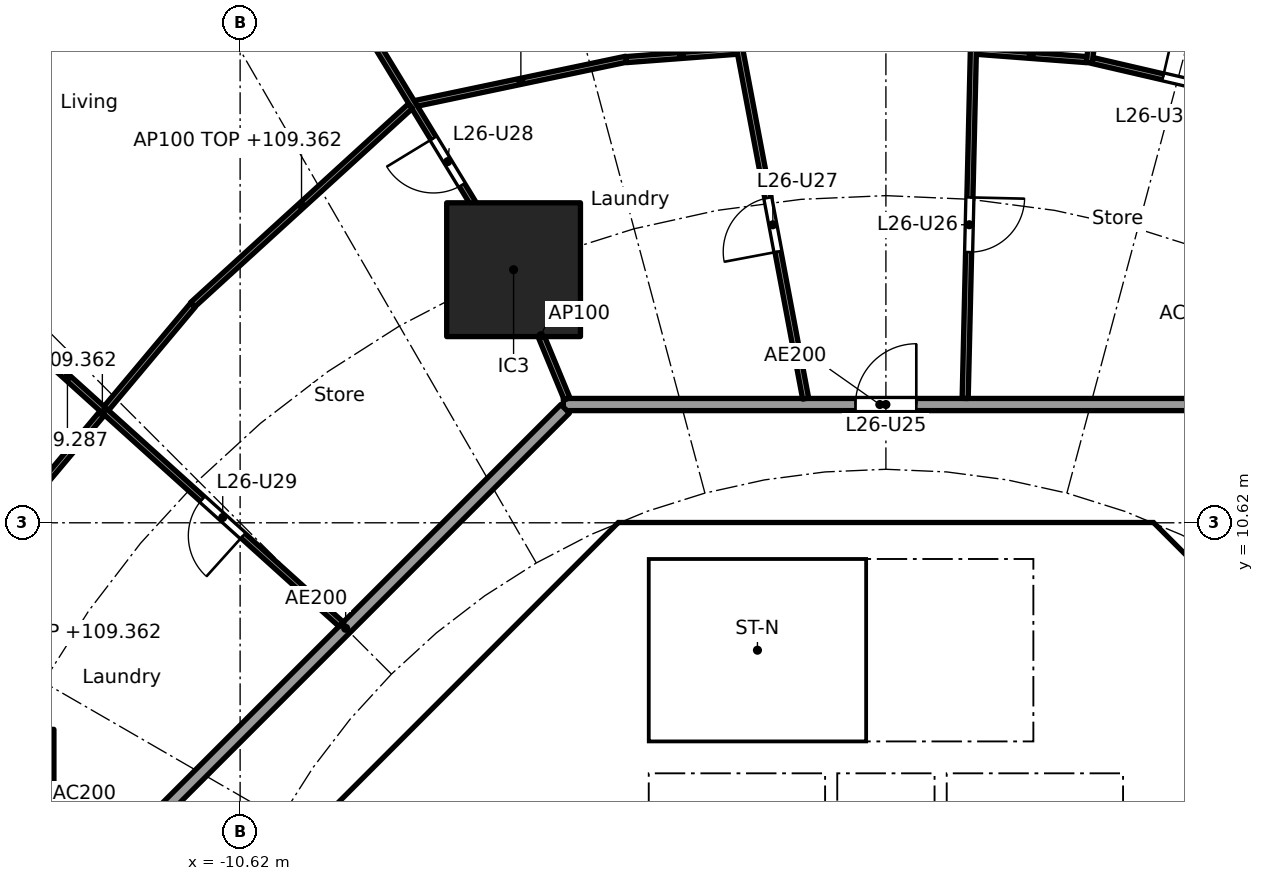
"""IFC4 building model, lengths in metres.
Left out: names, types, materials, properties, quantities, classifications, styles, units other than length and angle.
Written with IfcOpenShell. Run it as: python <this file> out.ifc"""

import sys

from ifc_helpers import new_model, si_unit, direction, frame, frame_2d, origin, origin_2d, place, context, subcontext, project, spatial, polyline, rectangle, outline, extrude, element, fill, save


model = new_model("IFC4")
c1 = context("Model", 3, precision=1e-05, world=origin(), true_north=direction((0.0, 1.0)))
c2 = subcontext(c1, "Body", "Model", "MODEL_VIEW")
j1 = project(units=[si_unit("LENGTHUNIT", "METRE"), si_unit("PLANEANGLEUNIT", "RADIAN")], contexts=[c1])
p1 = place(None, origin())
s1 = spatial("IfcSite", under=j1, at=p1, CompositionType="ELEMENT")
p2 = place(p1, origin())
s2 = spatial("IfcBuilding", under=s1, at=p2, CompositionType="ELEMENT")
p3 = place(p2, frame((0.0, 0.0, 106.6)))
s3 = spatial("IfcBuildingStorey", under=s2, at=p3, CompositionType="ELEMENT", Elevation=106.6)
for number, where, z_axis, x_axis in (
    (1, (-6.123, 14.782, 0.0), (0.0, 0.0, 1.0), (1.0, 0.0, 0.0)),
    (2, (-14.782, 6.123, 0.0), (0.0, 0.0, 1.0), (1.0, 0.0, 0.0)),
):
    element("IfcColumn", number, at=place(p3, frame(where, z_axis=z_axis, x_axis=x_axis)), inside=s3, PredefinedType="COLUMN", context=c2, shape_type="SweptSolid", body=[
        extrude(rectangle(XDim=2.2, YDim=2.2, at=origin_2d()), origin(), (0.0, 0.0, 1.0), 3.7),
    ])
p4 = place(p3, frame((9.988, 4.613, 0.0), z_axis=(0.0, 0.0, 1.0), x_axis=(-0.707106781187, 0.707106781187, 0.0)))
e3 = element("IfcWall", 3, at=p4, inside=s3, PredefinedType="SHEAR", context=c2, shape_type="SweptSolid", body=[
    extrude(rectangle(XDim=7.602, YDim=0.6, at=frame_2d((3.801, 0.0))), origin(), (0.0, 0.0, 1.0), 3.44),
])
p5 = place(p4, frame((3.201, 0.0, 0.0)))
e4 = element("IfcOpeningElement", 4, at=p5, cuts=e3, PredefinedType="OPENING", context=c2, shape_type="SweptSolid", body=[
    extrude(rectangle(XDim=1.2, YDim=2.1, at=frame_2d((0.6, 1.05))), frame((0.0, 0.31, 0.0), z_axis=(0.0, -1.0, 0.0), x_axis=(1.0, 0.0, 0.0)), (0.0, 0.0, 1.0), 0.62),
])
p6 = place(p3, frame((-4.613, 9.988, 0.0), z_axis=(0.0, 0.0, 1.0), x_axis=(-0.707106781187, -0.707106781187, 0.0)))
e5 = element("IfcWall", 5, at=p6, inside=s3, PredefinedType="SHEAR", context=c2, shape_type="SweptSolid", body=[
    extrude(rectangle(XDim=7.602, YDim=0.6, at=frame_2d((3.801, 0.0))), origin(), (0.0, 0.0, 1.0), 3.44),
])
p7 = place(p6, frame((0.351, 0.0, 0.0)))
e6 = element("IfcOpeningElement", 6, at=p7, cuts=e5, PredefinedType="OPENING", context=c2, shape_type="SweptSolid", body=[
    extrude(rectangle(XDim=1.1, YDim=2.1, at=frame_2d((0.55, 1.05))), frame((0.0, 0.31, 0.0), z_axis=(0.0, -1.0, 0.0), x_axis=(1.0, 0.0, 0.0)), (0.0, 0.0, 1.0), 0.62),
])
p8 = place(p3, frame((-5.8, 4.3, 0.0), z_axis=(0.0, 0.0, 1.0), x_axis=(0.0, 1.0, 0.0)))
e7 = element("IfcWall", 7, at=p8, inside=s3, PredefinedType="PARTITIONING", context=c2, shape_type="SweptSolid", body=[
    extrude(rectangle(XDim=3.927, YDim=0.15, at=frame_2d((1.963, 0.0))), origin(), (0.0, 0.0, 1.0), 3.44),
])
p9 = place(p8, frame((0.413, 0.0, 0.0)))
e8 = element("IfcOpeningElement", 8, at=p9, cuts=e7, PredefinedType="OPENING", context=c2, shape_type="SweptSolid", body=[
    extrude(rectangle(XDim=0.9, YDim=2.1, at=frame_2d((0.45, 1.05))), frame((0.0, 0.085, 0.0), z_axis=(0.0, -1.0, 0.0), x_axis=(1.0, 0.0, 0.0)), (0.0, 0.0, 1.0), 0.17),
])
p10 = place(p8, frame((2.489, 0.0, 0.0)))
e9 = element("IfcOpeningElement", 9, at=p10, cuts=e7, PredefinedType="OPENING", context=c2, shape_type="SweptSolid", body=[
    extrude(rectangle(XDim=0.9, YDim=2.1, at=frame_2d((0.45, 1.05))), frame((0.0, 0.085, 0.0), z_axis=(0.0, -1.0, 0.0), x_axis=(1.0, 0.0, 0.0)), (0.0, 0.0, 1.0), 0.17),
])
p11 = place(p3, frame((4.0, 4.3, 0.0), z_axis=(0.0, 0.0, 1.0), x_axis=(0.0, 1.0, 0.0)))
e10 = element("IfcWall", 10, at=p11, inside=s3, PredefinedType="SOLIDWALL", context=c2, shape_type="SweptSolid", body=[
    extrude(rectangle(XDim=2.2, YDim=0.2, at=frame_2d((1.1, 0.0))), origin(), (0.0, 0.0, 1.0), 3.44),
])
p12 = place(p11, frame((0.55, 0.0, 0.0)))
e11 = element("IfcOpeningElement", 11, at=p12, cuts=e10, PredefinedType="OPENING", context=c2, shape_type="SweptSolid", body=[
    extrude(rectangle(XDim=1.1, YDim=2.1, at=frame_2d((0.55, 1.05))), frame((0.0, 0.11, 0.0), z_axis=(0.0, -1.0, 0.0), x_axis=(1.0, 0.0, 0.0)), (0.0, 0.0, 1.0), 0.22),
])
p13 = place(p3, frame((-4.0, 4.3, 0.0), z_axis=(0.0, 0.0, 1.0), x_axis=(0.0, 1.0, 0.0)))
e12 = element("IfcWall", 12, at=p13, inside=s3, PredefinedType="SOLIDWALL", context=c2, shape_type="SweptSolid", body=[
    extrude(rectangle(XDim=2.2, YDim=0.2, at=frame_2d((1.1, 0.0))), origin(), (0.0, 0.0, 1.0), 3.44),
])
p14 = place(p13, frame((0.55, 0.0, 0.0)))
e13 = element("IfcOpeningElement", 13, at=p14, cuts=e12, PredefinedType="OPENING", context=c2, shape_type="SweptSolid", body=[
    extrude(rectangle(XDim=1.1, YDim=2.1, at=frame_2d((0.55, 1.05))), frame((0.0, 0.11, 0.0), z_axis=(0.0, -1.0, 0.0), x_axis=(1.0, 0.0, 0.0)), (0.0, 0.0, 1.0), 0.22),
])
p15 = place(p3, frame((4.0, 7.025, 0.0), z_axis=(0.0, 0.0, 1.0), x_axis=(0.0, 1.0, 0.0)))
e14 = element("IfcWall", 14, at=p15, inside=s3, PredefinedType="SOLIDWALL", context=c2, shape_type="SweptSolid", body=[
    extrude(rectangle(XDim=3.0, YDim=0.2, at=frame_2d((1.5, 0.0))), origin(), (0.0, 0.0, 1.0), 3.44),
])
p16 = place(p15, frame((0.925, 0.0, 0.0)))
e15 = element("IfcOpeningElement", 15, at=p16, cuts=e14, PredefinedType="OPENING", context=c2, shape_type="SweptSolid", body=[
    extrude(rectangle(XDim=1.1, YDim=2.1, at=frame_2d((0.55, 1.05))), frame((0.0, 0.11, 0.0), z_axis=(0.0, -1.0, 0.0), x_axis=(1.0, 0.0, 0.0)), (0.0, 0.0, 1.0), 0.22),
])
p17 = place(p3, origin())
e16 = element("IfcWall", 16, at=p17, inside=s3, PredefinedType="SHEAR", context=c2, shape_type="SweptSolid", body=[
    extrude(outline(polyline([(-4.152, 10.025), (-4.401, 9.776), (-4.825, 10.2), (-4.401, 10.625), (4.401, 10.625), (4.825, 10.2), (4.401, 9.776), (4.152, 10.025), (-4.152, 10.025)])), origin(), (0.0, 0.0, 1.0), 3.44),
])
p18 = place(p3, frame((-8.001, 6.1, 0.0), z_axis=(0.0, 0.0, 1.0), x_axis=(1.0, 0.0, 0.0)))
e17 = element("IfcWall", 17, at=p18, inside=s3, PredefinedType="PARTITIONING", context=c2, shape_type="SweptSolid", body=[
    extrude(rectangle(XDim=2.126, YDim=0.15, at=frame_2d((1.063, 0.0))), origin(), (0.0, 0.0, 1.0), 3.44),
])
for number, where, z_axis, x_axis in (
    (18, (-0.9, 4.3, 0.0), (0.0, 0.0, 1.0), (0.0, 1.0, 0.0)),
    (19, (0.9, 4.3, 0.0), (0.0, 0.0, 1.0), (0.0, 1.0, 0.0)),
):
    element("IfcWall", number, at=place(p3, frame(where, z_axis=z_axis, x_axis=x_axis)), inside=s3, PredefinedType="SOLIDWALL", context=c2, shape_type="SweptSolid", body=[
        extrude(rectangle(XDim=2.2, YDim=0.2, at=frame_2d((1.1, 0.0))), origin(), (0.0, 0.0, 1.0), 3.44),
    ])
p19 = place(p3, origin())
e20 = element("IfcWall", 20, at=p19, inside=s3, PredefinedType="SOLIDWALL", context=c2, shape_type="SweptSolid", body=[
    extrude(outline(polyline([(-3.9, 7.025), (-4.1, 7.025), (-4.1, 10.025), (-3.9, 10.025), (-3.9, 7.025)])), origin(), (0.0, 0.0, 1.0), 3.44),
])
p20 = place(p3, origin())
e21 = element("IfcWall", 21, at=p20, inside=s3, PredefinedType="SOLIDWALL", context=c2, shape_type="SweptSolid", body=[
    extrude(outline(polyline([(4.1, 6.5), (-4.1, 6.5), (-4.1, 7.025), (4.1, 7.025), (4.1, 6.5)])), origin(), (0.0, 0.0, 1.0), 3.44),
])
p21 = place(p3, frame((-12.657, 5.243, 0.0), z_axis=(0.0, 0.0, 1.0), x_axis=(-0.923843626288, 0.382770106157, 0.0)))
e22 = element("IfcWall", 22, at=p21, inside=s3, PredefinedType="PARTITIONING", context=c2, shape_type="SweptSolid", body=[
    extrude(rectangle(XDim=2.199, YDim=0.2, at=frame_2d((1.1, 0.0))), origin(), (0.0, 0.0, 1.0), 3.44),
])
p22 = place(p3, frame((5.104, 12.565, 0.0), z_axis=(0.0, 0.0, 1.0), x_axis=(-1.0, 0.0, 0.0)))
e23 = element("IfcWall", 23, at=p22, inside=s3, PredefinedType="PARTITIONING", context=c2, shape_type="SweptSolid", body=[
    extrude(rectangle(XDim=10.409, YDim=0.2, at=frame_2d((5.205, 0.0))), origin(), (0.0, 0.0, 1.0), 3.44),
])
p23 = place(p22, frame((4.604, 0.0, 0.0)))
e24 = element("IfcOpeningElement", 24, at=p23, cuts=e23, PredefinedType="OPENING", context=c2, shape_type="SweptSolid", body=[
    extrude(rectangle(XDim=1.0, YDim=2.1, at=frame_2d((0.5, 1.05))), frame((0.0, 0.11, 0.0), z_axis=(0.0, -1.0, 0.0), x_axis=(1.0, 0.0, 0.0)), (0.0, 0.0, 1.0), 0.22),
])
p24 = place(p3, frame((-5.275, 12.494, 0.0), z_axis=(0.0, 0.0, 1.0), x_axis=(-0.707106781187, -0.707106781187, 0.0)))
e25 = element("IfcWall", 25, at=p24, inside=s3, PredefinedType="PARTITIONING", context=c2, shape_type="SweptSolid", body=[
    extrude(rectangle(XDim=10.209, YDim=0.2, at=frame_2d((5.104, 0.0))), origin(), (0.0, 0.0, 1.0), 3.44),
])
p25 = place(p3, frame((7.004, 17.386, 0.0), z_axis=(0.0, 0.0, 1.0), x_axis=(-0.974172890163, 0.22580341023, 0.0)))
e26 = element("IfcWall", 26, at=p25, inside=s3, PredefinedType="PARTITIONING", context=c2, shape_type="SweptSolid", body=[
    extrude(rectangle(XDim=3.702, YDim=0.1, at=frame_2d((1.851, 0.0))), origin(), (0.0, 0.0, 1.0), 2.762),
])
p26 = place(p25, frame((1.611, 0.0, 0.0)))
e27 = element("IfcOpeningElement", 27, at=p26, cuts=e26, PredefinedType="OPENING", context=c2, shape_type="SweptSolid", body=[
    extrude(rectangle(XDim=0.9, YDim=2.1, at=frame_2d((0.45, 1.05))), frame((0.0, 0.06, 0.0), z_axis=(0.0, -1.0, 0.0), x_axis=(1.0, 0.0, 0.0)), (0.0, 0.0, 1.0), 0.12),
])
p27 = place(p3, frame((3.343, 18.184, 0.0), z_axis=(0.0, 0.0, 1.0), x_axis=(0.130596603503, 0.991435589009, 0.0)))
e28 = element("IfcWall", 28, at=p27, inside=s3, PredefinedType="PARTITIONING", context=c2, shape_type="SweptSolid", body=[
    extrude(rectangle(XDim=7.511, YDim=0.1, at=frame_2d((3.756, 0.0))), origin(), (0.0, 0.0, 1.0), 3.44),
])
p28 = place(p3, frame((3.299, 18.237, 0.0), z_axis=(0.0, 0.0, 1.0), x_axis=(-0.997152920483, 0.075405922664, 0.0)))
e29 = element("IfcWall", 29, at=p28, inside=s3, PredefinedType="PARTITIONING", context=c2, shape_type="SweptSolid", body=[
    extrude(rectangle(XDim=1.823, YDim=0.1, at=frame_2d((0.911, 0.0))), origin(), (0.0, 0.0, 1.0), 2.762),
])
p29 = place(p3, frame((1.303, 12.665, 0.0), z_axis=(0.0, 0.0, 1.0), x_axis=(0.023564110689, 0.999722327793, 0.0)))
e30 = element("IfcWall", 30, at=p29, inside=s3, PredefinedType="PARTITIONING", context=c2, shape_type="SweptSolid", body=[
    extrude(rectangle(XDim=21.664, YDim=0.1, at=frame_2d((10.832, 0.0))), origin(), (0.0, 0.0, 1.0), 2.687),
])
p30 = place(p29, frame((2.407, 0.0, 0.0)))
e31 = element("IfcOpeningElement", 31, at=p30, cuts=e30, PredefinedType="OPENING", context=c2, shape_type="SweptSolid", body=[
    extrude(rectangle(XDim=0.9, YDim=2.1, at=frame_2d((0.45, 1.05))), frame((0.0, 0.06, 0.0), z_axis=(0.0, -1.0, 0.0), x_axis=(1.0, 0.0, 0.0)), (0.0, 0.0, 1.0), 0.12),
])
p31 = place(p29, frame((9.034, 0.0, 0.0)))
e32 = element("IfcOpeningElement", 32, at=p31, cuts=e30, PredefinedType="OPENING", context=c2, shape_type="SweptSolid", body=[
    extrude(rectangle(XDim=0.9, YDim=2.1, at=frame_2d((0.45, 1.05))), frame((0.0, 0.06, 0.0), z_axis=(0.0, -1.0, 0.0), x_axis=(1.0, 0.0, 0.0)), (0.0, 0.0, 1.0), 0.12),
])
p32 = place(p29, frame((17.009, 0.0, 0.0)))
e33 = element("IfcOpeningElement", 33, at=p32, cuts=e30, PredefinedType="OPENING", context=c2, shape_type="SweptSolid", body=[
    extrude(rectangle(XDim=0.9, YDim=2.1, at=frame_2d((0.45, 1.05))), frame((0.0, 0.06, 0.0), z_axis=(0.0, -1.0, 0.0), x_axis=(1.0, 0.0, 0.0)), (0.0, 0.0, 1.0), 0.12),
])
p33 = place(p3, frame((-1.32, 12.663, 0.0), z_axis=(0.0, 0.0, 1.0), x_axis=(-0.185450638662, 0.982653581187, 0.0)))
e34 = element("IfcWall", 34, at=p33, inside=s3, PredefinedType="PARTITIONING", context=c2, shape_type="SweptSolid", body=[
    extrude(rectangle(XDim=22.043, YDim=0.1, at=frame_2d((11.021, 0.0))), origin(), (0.0, 0.0, 1.0), 2.687),
])
p34 = place(p33, frame((2.458, 0.0, 0.0)))
e35 = element("IfcOpeningElement", 35, at=p34, cuts=e34, PredefinedType="OPENING", context=c2, shape_type="SweptSolid", body=[
    extrude(rectangle(XDim=0.9, YDim=2.1, at=frame_2d((0.45, 1.05))), frame((0.0, 0.06, 0.0), z_axis=(0.0, -1.0, 0.0), x_axis=(1.0, 0.0, 0.0)), (0.0, 0.0, 1.0), 0.12),
])
p35 = place(p33, frame((9.202, 0.0, 0.0)))
e36 = element("IfcOpeningElement", 36, at=p35, cuts=e34, PredefinedType="OPENING", context=c2, shape_type="SweptSolid", body=[
    extrude(rectangle(XDim=0.9, YDim=2.1, at=frame_2d((0.45, 1.05))), frame((0.0, 0.06, 0.0), z_axis=(0.0, -1.0, 0.0), x_axis=(1.0, 0.0, 0.0)), (0.0, 0.0, 1.0), 0.12),
])
p36 = place(p3, frame((-2.453, 18.374, 0.0), z_axis=(0.0, 0.0, 1.0), x_axis=(-0.997153681897, -0.075395853197, 0.0)))
e37 = element("IfcWall", 37, at=p36, inside=s3, PredefinedType="PARTITIONING", context=c2, shape_type="SweptSolid", body=[
    extrude(rectangle(XDim=1.823, YDim=0.1, at=frame_2d((0.912, 0.0))), origin(), (0.0, 0.0, 1.0), 3.44),
])
p37 = place(p3, frame((-4.272, 18.243, 0.0), z_axis=(0.0, 0.0, 1.0), x_axis=(-0.978622947907, -0.205662650547, 0.0)))
e38 = element("IfcWall", 38, at=p37, inside=s3, PredefinedType="PARTITIONING", context=c2, shape_type="SweptSolid", body=[
    extrude(rectangle(XDim=3.538, YDim=0.1, at=frame_2d((1.769, 0.0))), origin(), (0.0, 0.0, 1.0), 2.762),
])
p38 = place(p3, frame((-5.243, 12.657, 0.0), z_axis=(0.0, 0.0, 1.0), x_axis=(-0.382703272338, 0.923871314276, 0.0)))
e39 = element("IfcWall", 39, at=p38, inside=s3, PredefinedType="PARTITIONING", context=c2, shape_type="SweptSolid", body=[
    extrude(rectangle(XDim=2.249, YDim=0.1, at=frame_2d((1.125, 0.0))), origin(), (0.0, 0.0, 1.0), 3.44),
])
p39 = place(p3, frame((-6.149, 14.825, 0.0), z_axis=(0.0, 0.0, 1.0), x_axis=(-0.520411490252, 0.853915616917, 0.0)))
e40 = element("IfcWall", 40, at=p39, inside=s3, PredefinedType="PARTITIONING", context=c2, shape_type="SweptSolid", body=[
    extrude(rectangle(XDim=10.435, YDim=0.1, at=frame_2d((5.218, 0.0))), origin(), (0.0, 0.0, 1.0), 3.44),
])
p40 = place(p39, frame((1.582, 0.0, 0.0)))
e41 = element("IfcOpeningElement", 41, at=p40, cuts=e40, PredefinedType="OPENING", context=c2, shape_type="SweptSolid", body=[
    extrude(rectangle(XDim=0.9, YDim=2.1, at=frame_2d((0.45, 1.05))), frame((0.0, 0.06, 0.0), z_axis=(0.0, -1.0, 0.0), x_axis=(1.0, 0.0, 0.0)), (0.0, 0.0, 1.0), 0.12),
])
p41 = place(p39, frame((6.312, 0.0, 0.0)))
e42 = element("IfcOpeningElement", 42, at=p41, cuts=e40, PredefinedType="OPENING", context=c2, shape_type="SweptSolid", body=[
    extrude(rectangle(XDim=0.9, YDim=2.1, at=frame_2d((0.45, 1.05))), frame((0.0, 0.06, 0.0), z_axis=(0.0, -1.0, 0.0), x_axis=(1.0, 0.0, 0.0)), (0.0, 0.0, 1.0), 0.12),
])
p42 = place(p3, frame((-7.82, 17.472, 0.0), z_axis=(0.0, 0.0, 1.0), x_axis=(-0.73885182489, -0.67386792538, 0.0)))
e43 = element("IfcWall", 43, at=p42, inside=s3, PredefinedType="PARTITIONING", context=c2, shape_type="SweptSolid", body=[
    extrude(rectangle(XDim=4.846, YDim=0.1, at=frame_2d((2.423, 0.0))), origin(), (0.0, 0.0, 1.0), 2.762),
])
p43 = place(p3, frame((-11.396, 14.202, 0.0), z_axis=(0.0, 0.0, 1.0), x_axis=(-0.642475660273, -0.766306091557, 0.0)))
e44 = element("IfcWall", 44, at=p43, inside=s3, PredefinedType="PARTITIONING", context=c2, shape_type="SweptSolid", body=[
    extrude(rectangle(XDim=4.637, YDim=0.1, at=frame_2d((2.319, 0.0))), origin(), (0.0, 0.0, 1.0), 2.762),
])
p44 = place(p3, frame((-8.959, 8.952, 0.0), z_axis=(0.0, 0.0, 1.0), x_axis=(-0.742679904999, 0.669646592398, 0.0)))
e45 = element("IfcWall", 45, at=p44, inside=s3, PredefinedType="PARTITIONING", context=c2, shape_type="SweptSolid", body=[
    extrude(rectangle(XDim=12.121, YDim=0.1, at=frame_2d((6.061, 0.0))), origin(), (0.0, 0.0, 1.0), 2.687),
])
p45 = place(p44, frame((2.172, 0.0, 0.0)))
e46 = element("IfcOpeningElement", 46, at=p45, cuts=e45, PredefinedType="OPENING", context=c2, shape_type="SweptSolid", body=[
    extrude(rectangle(XDim=0.9, YDim=2.1, at=frame_2d((0.45, 1.05))), frame((0.0, 0.06, 0.0), z_axis=(0.0, -1.0, 0.0), x_axis=(1.0, 0.0, 0.0)), (0.0, 0.0, 1.0), 0.12),
])
p46 = place(p44, frame((8.233, 0.0, 0.0)))
e47 = element("IfcOpeningElement", 47, at=p46, cuts=e45, PredefinedType="OPENING", context=c2, shape_type="SweptSolid", body=[
    extrude(rectangle(XDim=0.9, YDim=2.1, at=frame_2d((0.45, 1.05))), frame((0.0, 0.06, 0.0), z_axis=(0.0, -1.0, 0.0), x_axis=(1.0, 0.0, 0.0)), (0.0, 0.0, 1.0), 0.12),
])
p47 = place(p16, origin())
e48 = element("IfcDoor", 48, at=p47, inside=s3, OperationType="SINGLE_SWING_LEFT", PredefinedType="DOOR", context=c2, shape_type="SweptSolid", body=[
    extrude(rectangle(XDim=1.1, YDim=2.1, at=frame_2d((0.55, 1.05))), frame((0.0, 0.025, 0.0), z_axis=(0.0, -1.0, 0.0), x_axis=(1.0, 0.0, 0.0)), (0.0, 0.0, 1.0), 0.05),
])
fill(e15, e48)
p48 = place(p10, origin())
e49 = element("IfcDoor", 49, at=p48, inside=s3, OperationType="SINGLE_SWING_RIGHT", PredefinedType="DOOR", context=c2, shape_type="SweptSolid", body=[
    extrude(rectangle(XDim=0.9, YDim=2.1, at=frame_2d((0.45, 1.05))), frame((0.0, 0.025, 0.0), z_axis=(0.0, -1.0, 0.0), x_axis=(1.0, 0.0, 0.0)), (0.0, 0.0, 1.0), 0.05),
])
fill(e9, e49)
p49 = place(p7, origin())
e50 = element("IfcDoor", 50, at=p49, inside=s3, OperationType="SINGLE_SWING_RIGHT", PredefinedType="DOOR", context=c2, shape_type="SweptSolid", body=[
    extrude(rectangle(XDim=1.1, YDim=2.1, at=frame_2d((0.55, 1.05))), frame((0.0, 0.025, 0.0), z_axis=(0.0, -1.0, 0.0), x_axis=(1.0, 0.0, 0.0)), (0.0, 0.0, 1.0), 0.05),
])
fill(e6, e50)
p50 = place(p23, frame((1.0, 0.0, 0.0), x_axis=(-1.0, 0.0, 0.0)))
e51 = element("IfcDoor", 51, at=p50, inside=s3, OperationType="SINGLE_SWING_RIGHT", PredefinedType="DOOR", context=c2, shape_type="SweptSolid", body=[
    extrude(rectangle(XDim=1.0, YDim=2.1, at=frame_2d((0.5, 1.05))), frame((0.0, 0.025, 0.0), z_axis=(0.0, -1.0, 0.0), x_axis=(1.0, 0.0, 0.0)), (0.0, 0.0, 1.0), 0.05),
])
fill(e24, e51)
p51 = place(p30, frame((0.9, 0.0, 0.0), x_axis=(-1.0, 0.0, 0.0)))
e52 = element("IfcDoor", 52, at=p51, inside=s3, OperationType="SINGLE_SWING_LEFT", PredefinedType="DOOR", context=c2, shape_type="SweptSolid", body=[
    extrude(rectangle(XDim=0.9, YDim=2.1, at=frame_2d((0.45, 1.05))), frame((0.0, 0.025, 0.0), z_axis=(0.0, -1.0, 0.0), x_axis=(1.0, 0.0, 0.0)), (0.0, 0.0, 1.0), 0.05),
])
fill(e31, e52)
p52 = place(p34, origin())
e53 = element("IfcDoor", 53, at=p52, inside=s3, OperationType="SINGLE_SWING_LEFT", PredefinedType="DOOR", context=c2, shape_type="SweptSolid", body=[
    extrude(rectangle(XDim=0.9, YDim=2.1, at=frame_2d((0.45, 1.05))), frame((0.0, 0.025, 0.0), z_axis=(0.0, -1.0, 0.0), x_axis=(1.0, 0.0, 0.0)), (0.0, 0.0, 1.0), 0.05),
])
fill(e35, e53)
p53 = place(p40, origin())
e54 = element("IfcDoor", 54, at=p53, inside=s3, OperationType="SINGLE_SWING_RIGHT", PredefinedType="DOOR", context=c2, shape_type="SweptSolid", body=[
    extrude(rectangle(XDim=0.9, YDim=2.1, at=frame_2d((0.45, 1.05))), frame((0.0, 0.025, 0.0), z_axis=(0.0, -1.0, 0.0), x_axis=(1.0, 0.0, 0.0)), (0.0, 0.0, 1.0), 0.05),
])
fill(e41, e54)
p54 = place(p45, origin())
e55 = element("IfcDoor", 55, at=p54, inside=s3, OperationType="SINGLE_SWING_LEFT", PredefinedType="DOOR", context=c2, shape_type="SweptSolid", body=[
    extrude(rectangle(XDim=0.9, YDim=2.1, at=frame_2d((0.45, 1.05))), frame((0.0, 0.025, 0.0), z_axis=(0.0, -1.0, 0.0), x_axis=(1.0, 0.0, 0.0)), (0.0, 0.0, 1.0), 0.05),
])
fill(e46, e55)
p55 = place(p26, frame((0.9, 0.0, 0.0), x_axis=(-1.0, 0.0, 0.0)))
e56 = element("IfcDoor", 56, at=p55, inside=s3, OperationType="SINGLE_SWING_LEFT", PredefinedType="DOOR", context=c2, shape_type="SweptSolid", body=[
    extrude(rectangle(XDim=0.9, YDim=2.1, at=frame_2d((0.45, 1.05))), frame((0.0, 0.025, 0.0), z_axis=(0.0, -1.0, 0.0), x_axis=(1.0, 0.0, 0.0)), (0.0, 0.0, 1.0), 0.05),
])
fill(e27, e56)
save(model, sys.argv[1])
